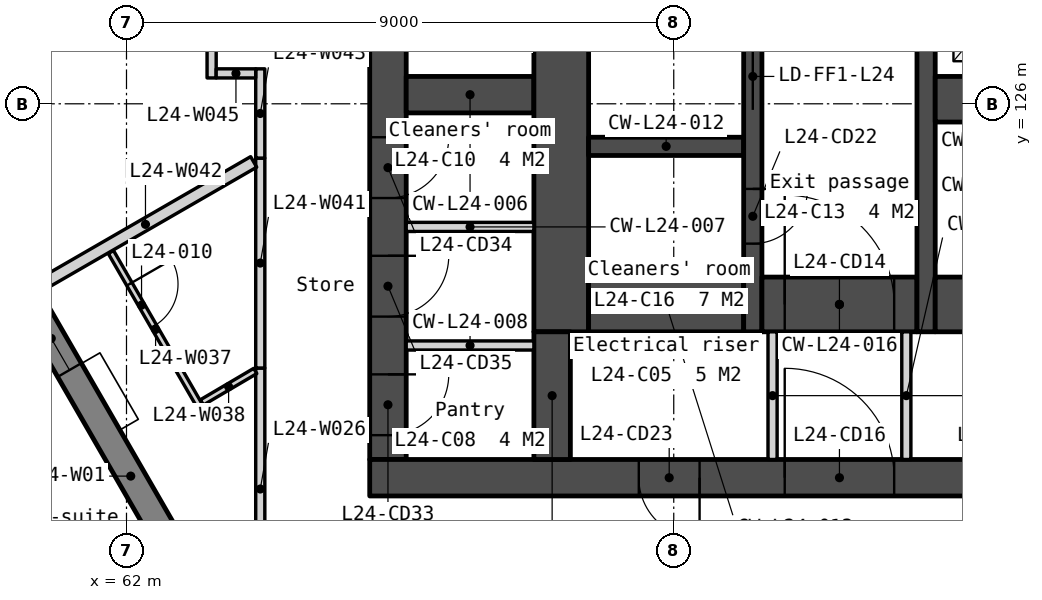
"""IFC4 building model, lengths in metres.
Left out: names, types, materials, properties, quantities, classifications, styles, units other than length and angle.
Written with IfcOpenShell. Run it as: python <this file> out.ifc"""

import sys

from ifc_helpers import new_model, si_unit, direction, frame, frame_2d, origin, place, context, subcontext, project, spatial, polyline, rectangle, outline, extrude, element, fill, save


model = new_model("IFC4")
c1 = context("Model", 3, precision=1e-05, world=origin(), true_north=direction((0.0, 1.0)))
c2 = subcontext(c1, "Body", "Model", "MODEL_VIEW")
j1 = project(units=[si_unit("LENGTHUNIT", "METRE"), si_unit("PLANEANGLEUNIT", "RADIAN")], contexts=[c1])
p1 = place(None, origin())
s1 = spatial("IfcSite", under=j1, at=p1, CompositionType="ELEMENT")
p2 = place(p1, origin())
s2 = spatial("IfcBuilding", under=s1, at=p2, CompositionType="ELEMENT")
p3 = place(p2, frame((0.0, 0.0, 99.3)))
s3 = spatial("IfcBuildingStorey", under=s2, at=p3, CompositionType="ELEMENT", Elevation=99.3)
p4 = place(p3, frame((66.3, 133.95, 0.0), z_axis=(0.0, 0.0, 1.0), x_axis=(0.0, -1.0, 0.0)))
e1 = element("IfcWall", 1, at=p4, inside=s3, PredefinedType="SOLIDWALL", context=c2, shape_type="SweptSolid", body=[
    extrude(rectangle(XDim=13.8, YDim=0.6, at=frame_2d((6.9, 0.0))), origin(), (0.0, 0.0, 1.0), 3.35),
])
p5 = place(p4, frame((0.6, 0.0, 0.0)))
e2 = element("IfcOpeningElement", 2, at=p5, cuts=e1, PredefinedType="OPENING", context=c2, shape_type="SweptSolid", body=[
    extrude(rectangle(XDim=1.1, YDim=2.1, at=frame_2d((0.55, 1.05))), frame((0.0, 0.31, 0.0), z_axis=(0.0, -1.0, 0.0), x_axis=(1.0, 0.0, 0.0)), (0.0, 0.0, 1.0), 0.62),
])
p6 = place(p4, frame((12.4, 0.0, 0.0)))
e3 = element("IfcOpeningElement", 3, at=p6, cuts=e1, PredefinedType="OPENING", context=c2, shape_type="SweptSolid", body=[
    extrude(rectangle(XDim=1.0, YDim=2.1, at=frame_2d((0.5, 1.05))), frame((0.0, 0.31, 0.0), z_axis=(0.0, -1.0, 0.0), x_axis=(1.0, 0.0, 0.0)), (0.0, 0.0, 1.0), 0.62),
])
p7 = place(p4, frame((8.5, 0.0, 0.0)))
e4 = element("IfcOpeningElement", 4, at=p7, cuts=e1, PredefinedType="OPENING", context=c2, shape_type="SweptSolid", body=[
    extrude(rectangle(XDim=1.0, YDim=2.1, at=frame_2d((0.5, 1.05))), frame((0.0, 0.31, 0.0), z_axis=(0.0, -1.0, 0.0), x_axis=(1.0, 0.0, 0.0)), (0.0, 0.0, 1.0), 0.62),
])
p8 = place(p4, frame((10.45, 0.0, 0.0)))
e5 = element("IfcOpeningElement", 5, at=p8, cuts=e1, PredefinedType="OPENING", context=c2, shape_type="SweptSolid", body=[
    extrude(rectangle(XDim=1.0, YDim=2.1, at=frame_2d((0.5, 1.05))), frame((0.0, 0.31, 0.0), z_axis=(0.0, -1.0, 0.0), x_axis=(1.0, 0.0, 0.0)), (0.0, 0.0, 1.0), 0.62),
])
p9 = place(p3, frame((66.0, 119.85, 0.0), z_axis=(0.0, 0.0, 1.0), x_axis=(1.0, 0.0, 0.0)))
e6 = element("IfcWall", 6, at=p9, inside=s3, PredefinedType="SOLIDWALL", context=c2, shape_type="SweptSolid", body=[
    extrude(rectangle(XDim=28.0, YDim=0.6, at=frame_2d((14.0, 0.0))), origin(), (0.0, 0.0, 1.0), 3.35),
])
p10 = place(p9, frame((6.825, 0.0, 0.0)))
e7 = element("IfcOpeningElement", 7, at=p10, cuts=e6, PredefinedType="OPENING", context=c2, shape_type="SweptSolid", body=[
    extrude(rectangle(XDim=1.8, YDim=2.1, at=frame_2d((0.9, 1.05))), frame((0.0, 0.31, 0.0), z_axis=(0.0, -1.0, 0.0), x_axis=(1.0, 0.0, 0.0)), (0.0, 0.0, 1.0), 0.62),
])
p11 = place(p9, frame((15.85, 0.0, 0.0)))
e8 = element("IfcOpeningElement", 8, at=p11, cuts=e6, PredefinedType="OPENING", context=c2, shape_type="SweptSolid", body=[
    extrude(rectangle(XDim=1.5, YDim=2.1, at=frame_2d((0.75, 1.05))), frame((0.0, 0.31, 0.0), z_axis=(0.0, -1.0, 0.0), x_axis=(1.0, 0.0, 0.0)), (0.0, 0.0, 1.0), 0.62),
])
p12 = place(p9, frame((19.375, 0.0, 0.0)))
e9 = element("IfcOpeningElement", 9, at=p12, cuts=e6, PredefinedType="OPENING", context=c2, shape_type="SweptSolid", body=[
    extrude(rectangle(XDim=1.8, YDim=2.1, at=frame_2d((0.9, 1.05))), frame((0.0, 0.31, 0.0), z_axis=(0.0, -1.0, 0.0), x_axis=(1.0, 0.0, 0.0)), (0.0, 0.0, 1.0), 0.62),
])
p13 = place(p9, frame((4.425, 0.0, 0.0)))
e10 = element("IfcOpeningElement", 10, at=p13, cuts=e6, PredefinedType="OPENING", context=c2, shape_type="SweptSolid", body=[
    extrude(rectangle(XDim=1.0, YDim=2.1, at=frame_2d((0.5, 1.05))), frame((0.0, 0.31, 0.0), z_axis=(0.0, -1.0, 0.0), x_axis=(1.0, 0.0, 0.0)), (0.0, 0.0, 1.0), 0.62),
])
p14 = place(p9, frame((9.925, 0.0, 0.0)))
e11 = element("IfcOpeningElement", 11, at=p14, cuts=e6, PredefinedType="OPENING", context=c2, shape_type="SweptSolid", body=[
    extrude(rectangle(XDim=1.0, YDim=2.1, at=frame_2d((0.5, 1.05))), frame((0.0, 0.31, 0.0), z_axis=(0.0, -1.0, 0.0), x_axis=(1.0, 0.0, 0.0)), (0.0, 0.0, 1.0), 0.62),
])
p15 = place(p9, frame((13.125, 0.0, 0.0)))
e12 = element("IfcOpeningElement", 12, at=p15, cuts=e6, PredefinedType="OPENING", context=c2, shape_type="SweptSolid", body=[
    extrude(rectangle(XDim=1.0, YDim=2.1, at=frame_2d((0.5, 1.05))), frame((0.0, 0.31, 0.0), z_axis=(0.0, -1.0, 0.0), x_axis=(1.0, 0.0, 0.0)), (0.0, 0.0, 1.0), 0.62),
])
p16 = place(p9, frame((21.725, 0.0, 0.0)))
e13 = element("IfcOpeningElement", 13, at=p16, cuts=e6, PredefinedType="OPENING", context=c2, shape_type="SweptSolid", body=[
    extrude(rectangle(XDim=1.0, YDim=2.1, at=frame_2d((0.5, 1.05))), frame((0.0, 0.31, 0.0), z_axis=(0.0, -1.0, 0.0), x_axis=(1.0, 0.0, 0.0)), (0.0, 0.0, 1.0), 0.62),
])
p17 = place(p9, frame((23.425, 0.0, 0.0)))
e14 = element("IfcOpeningElement", 14, at=p17, cuts=e6, PredefinedType="OPENING", context=c2, shape_type="SweptSolid", body=[
    extrude(rectangle(XDim=1.0, YDim=2.1, at=frame_2d((0.5, 1.05))), frame((0.0, 0.31, 0.0), z_axis=(0.0, -1.0, 0.0), x_axis=(1.0, 0.0, 0.0)), (0.0, 0.0, 1.0), 0.62),
])
p18 = place(p3, frame((66.6, 126.15, 0.0), z_axis=(0.0, 0.0, 1.0), x_axis=(1.0, 0.0, 0.0)))
e15 = element("IfcWall", 15, at=p18, inside=s3, PredefinedType="SOLIDWALL", context=c2, shape_type="SweptSolid", body=[
    extrude(rectangle(XDim=2.1, YDim=0.6, at=frame_2d((1.05, 0.0))), origin(), (0.0, 0.0, 1.0), 3.35),
])
for number, where, z_axis, x_axis in (
    (16, (66.6, 123.975, 0.0), (0.0, 0.0, 1.0), (1.0, 0.0, 0.0)),
    (17, (66.6, 122.025, 0.0), (0.0, 0.0, 1.0), (1.0, 0.0, 0.0)),
):
    element("IfcWall", number, at=place(p3, frame(where, z_axis=z_axis, x_axis=x_axis)), inside=s3, PredefinedType="PARTITIONING", context=c2, shape_type="SweptSolid", body=[
        extrude(rectangle(XDim=2.1, YDim=0.15, at=frame_2d((1.05, 0.0))), origin(), (0.0, 0.0, 1.0), 3.35),
    ])
p19 = place(p3, frame((69.15, 133.95, 0.0), z_axis=(0.0, 0.0, 1.0), x_axis=(0.0, -1.0, 0.0)))
e18 = element("IfcWall", 18, at=p19, inside=s3, PredefinedType="SOLIDWALL", context=c2, shape_type="SweptSolid", body=[
    extrude(rectangle(XDim=11.7, YDim=0.9, at=frame_2d((5.85, 0.0))), origin(), (0.0, 0.0, 1.0), 3.35),
])
p20 = place(p3, frame((69.0, 122.25, 0.0), z_axis=(0.0, 0.0, 1.0), x_axis=(0.0, -1.0, 0.0)))
e19 = element("IfcWall", 19, at=p20, inside=s3, PredefinedType="SOLIDWALL", context=c2, shape_type="SweptSolid", body=[
    extrude(rectangle(XDim=2.1, YDim=0.6, at=frame_2d((1.05, 0.0))), origin(), (0.0, 0.0, 1.0), 3.35),
])
p21 = place(p3, frame((69.6, 125.3, 0.0), z_axis=(0.0, 0.0, 1.0), x_axis=(1.0, 0.0, 0.0)))
e20 = element("IfcWall", 20, at=p21, inside=s3, PredefinedType="SOLIDWALL", context=c2, shape_type="SweptSolid", body=[
    extrude(rectangle(XDim=2.55, YDim=0.3, at=frame_2d((1.275, 0.0))), origin(), (0.0, 0.0, 1.0), 3.35),
])
p22 = place(p3, frame((69.6, 122.7, 0.0), z_axis=(0.0, 0.0, 1.0), x_axis=(1.0, 0.0, 0.0)))
e21 = element("IfcWall", 21, at=p22, inside=s3, PredefinedType="SOLIDWALL", context=c2, shape_type="SweptSolid", body=[
    extrude(rectangle(XDim=2.55, YDim=0.9, at=frame_2d((1.275, 0.0))), origin(), (0.0, 0.0, 1.0), 3.35),
])
p23 = place(p3, frame((72.3, 133.95, 0.0), z_axis=(0.0, 0.0, 1.0), x_axis=(0.0, -1.0, 0.0)))
e22 = element("IfcWall", 22, at=p23, inside=s3, PredefinedType="SOLIDWALL", context=c2, shape_type="SweptSolid", body=[
    extrude(rectangle(XDim=11.7, YDim=0.3, at=frame_2d((5.85, 0.0))), origin(), (0.0, 0.0, 1.0), 3.35),
])
p24 = place(p23, frame((6.95, 0.0, 0.0)))
e23 = element("IfcOpeningElement", 23, at=p24, cuts=e22, PredefinedType="OPENING", context=c2, shape_type="SweptSolid", body=[
    extrude(rectangle(XDim=1.1, YDim=2.1, at=frame_2d((0.55, 1.05))), frame((0.0, 0.16, 0.0), z_axis=(0.0, -1.0, 0.0), x_axis=(1.0, 0.0, 0.0)), (0.0, 0.0, 1.0), 0.32),
])
p25 = place(p23, frame((9.35, 0.0, 0.0)))
e24 = element("IfcOpeningElement", 24, at=p25, cuts=e22, PredefinedType="OPENING", context=c2, shape_type="SweptSolid", body=[
    extrude(rectangle(XDim=0.9, YDim=2.1, at=frame_2d((0.45, 1.05))), frame((0.0, 0.16, 0.0), z_axis=(0.0, -1.0, 0.0), x_axis=(1.0, 0.0, 0.0)), (0.0, 0.0, 1.0), 0.32),
])
p26 = place(p23, frame((5.1, 0.0, 0.0)))
e25 = element("IfcOpeningElement", 25, at=p26, cuts=e22, PredefinedType="OPENING", context=c2, shape_type="SweptSolid", body=[
    extrude(rectangle(XDim=1.0, YDim=2.1, at=frame_2d((0.5, 1.05))), frame((0.0, 0.16, 0.0), z_axis=(0.0, -1.0, 0.0), x_axis=(1.0, 0.0, 0.0)), (0.0, 0.0, 1.0), 0.32),
])
p27 = place(p3, frame((72.45, 122.7, 0.0), z_axis=(0.0, 0.0, 1.0), x_axis=(1.0, 0.0, 0.0)))
e26 = element("IfcWall", 26, at=p27, inside=s3, PredefinedType="SOLIDWALL", context=c2, shape_type="SweptSolid", body=[
    extrude(rectangle(XDim=2.55, YDim=0.9, at=frame_2d((1.275, 0.0))), origin(), (0.0, 0.0, 1.0), 3.35),
])
p28 = place(p27, frame((0.375, 0.0, 0.0)))
e27 = element("IfcOpeningElement", 27, at=p28, cuts=e26, PredefinedType="OPENING", context=c2, shape_type="SweptSolid", body=[
    extrude(rectangle(XDim=1.8, YDim=2.1, at=frame_2d((0.9, 1.05))), frame((0.0, 0.46, 0.0), z_axis=(0.0, -1.0, 0.0), x_axis=(1.0, 0.0, 0.0)), (0.0, 0.0, 1.0), 0.92),
])
for number, where, z_axis, x_axis in (
    (28, (72.625, 122.25, 0.0), (0.0, 0.0, 1.0), (0.0, -1.0, 0.0)),
    (29, (74.825, 122.25, 0.0), (0.0, 0.0, 1.0), (0.0, -1.0, 0.0)),
):
    element("IfcWall", number, at=place(p3, frame(where, z_axis=z_axis, x_axis=x_axis)), inside=s3, PredefinedType="PARTITIONING", context=c2, shape_type="SweptSolid", body=[
        extrude(rectangle(XDim=2.1, YDim=0.15, at=frame_2d((1.05, 0.0))), origin(), (0.0, 0.0, 1.0), 3.35),
    ])
p29 = place(p3, frame((75.15, 133.95, 0.0), z_axis=(0.0, 0.0, 1.0), x_axis=(0.0, -1.0, 0.0)))
e30 = element("IfcWall", 30, at=p29, inside=s3, PredefinedType="SOLIDWALL", context=c2, shape_type="SweptSolid", body=[
    extrude(rectangle(XDim=11.7, YDim=0.3, at=frame_2d((5.85, 0.0))), origin(), (0.0, 0.0, 1.0), 3.35),
])
p30 = place(p3, frame((75.3, 126.075, 0.0), z_axis=(0.0, 0.0, 1.0), x_axis=(1.0, 0.0, 0.0)))
e31 = element("IfcWall", 31, at=p30, inside=s3, PredefinedType="SOLIDWALL", context=c2, shape_type="SweptSolid", body=[
    extrude(rectangle(XDim=2.1, YDim=0.75, at=frame_2d((1.05, 0.0))), origin(), (0.0, 0.0, 1.0), 3.35),
])
p31 = place(p3, frame((75.3, 122.7, 0.0), z_axis=(0.0, 0.0, 1.0), x_axis=(1.0, 0.0, 0.0)))
e32 = element("IfcWall", 32, at=p31, inside=s3, PredefinedType="SOLIDWALL", context=c2, shape_type="SweptSolid", body=[
    extrude(rectangle(XDim=6.2, YDim=0.9, at=frame_2d((3.1, 0.0))), origin(), (0.0, 0.0, 1.0), 3.35),
])
p32 = place(p3, frame((56.073, 130.263, -0.15), z_axis=(0.0, 0.0, 1.0), x_axis=(0.500002343971, -0.866024050488, 0.0)))
e33 = element("IfcWall", 33, at=p32, inside=s3, PredefinedType="SOLIDWALL", context=c2, shape_type="SweptSolid", body=[
    extrude(outline(polyline([(0.0, 0.0), (0.0, 3.5), (23.986, 3.5), (23.986, 0.0), (0.0, 0.0)])), frame((0.0, 0.225, 0.0), z_axis=(0.0, -1.0, 0.0), x_axis=(1.0, 0.0, 0.0)), (0.0, 0.0, 1.0), 0.45),
])
p33 = place(p32, frame((7.079, 0.0, 1.05)))
e34 = element("IfcOpeningElement", 34, at=p33, cuts=e33, PredefinedType="OPENING", context=c2, shape_type="SweptSolid", body=[
    extrude(rectangle(XDim=1.2, YDim=1.5, at=frame_2d((0.6, 0.75))), frame((0.0, 0.235, 0.0), z_axis=(0.0, -1.0, 0.0), x_axis=(1.0, 0.0, 0.0)), (0.0, 0.0, 1.0), 0.47),
])
p34 = place(p32, frame((8.779, 0.0, 1.05)))
e35 = element("IfcOpeningElement", 35, at=p34, cuts=e33, PredefinedType="OPENING", context=c2, shape_type="SweptSolid", body=[
    extrude(rectangle(XDim=1.2, YDim=1.5, at=frame_2d((0.6, 0.75))), frame((0.0, 0.235, 0.0), z_axis=(0.0, -1.0, 0.0), x_axis=(1.0, 0.0, 0.0)), (0.0, 0.0, 1.0), 0.47),
])
p35 = place(p32, frame((15.607, 0.0, 1.05)))
e36 = element("IfcOpeningElement", 36, at=p35, cuts=e33, PredefinedType="OPENING", context=c2, shape_type="SweptSolid", body=[
    extrude(rectangle(XDim=1.2, YDim=1.5, at=frame_2d((0.6, 0.75))), frame((0.0, 0.235, 0.0), z_axis=(0.0, -1.0, 0.0), x_axis=(1.0, 0.0, 0.0)), (0.0, 0.0, 1.0), 0.47),
])
p36 = place(p32, frame((17.307, 0.0, 1.05)))
e37 = element("IfcOpeningElement", 37, at=p36, cuts=e33, PredefinedType="OPENING", context=c2, shape_type="SweptSolid", body=[
    extrude(rectangle(XDim=1.2, YDim=1.5, at=frame_2d((0.6, 0.75))), frame((0.0, 0.235, 0.0), z_axis=(0.0, -1.0, 0.0), x_axis=(1.0, 0.0, 0.0)), (0.0, 0.0, 1.0), 0.47),
])
p37 = place(p3, frame((64.2, 117.675, 0.0), z_axis=(0.0, 0.0, 1.0), x_axis=(0.0, 1.0, 0.0)))
e38 = element("IfcWall", 38, at=p37, inside=s3, PredefinedType="PARTITIONING", context=c2, shape_type="SweptSolid", body=[
    extrude(rectangle(XDim=3.979, YDim=0.15, at=frame_2d((1.99, 0.0))), origin(), (0.0, 0.0, 1.0), 3.35),
])
p38 = place(p3, frame((61.743, 123.562, 0.0), z_axis=(0.0, 0.0, 1.0), x_axis=(0.500050696077, -0.865996132412, 0.0)))
e39 = element("IfcWall", 39, at=p38, inside=s3, PredefinedType="PARTITIONING", context=c2, shape_type="SweptSolid", body=[
    extrude(rectangle(XDim=2.94, YDim=0.1, at=frame_2d((1.47, 0.0))), origin(), (0.0, 0.0, 1.0), 3.35),
])
p39 = place(p38, frame((0.608, 0.0, 0.0)))
e40 = element("IfcOpeningElement", 40, at=p39, cuts=e39, PredefinedType="OPENING", context=c2, shape_type="SweptSolid", body=[
    extrude(rectangle(XDim=0.8, YDim=2.1, at=frame_2d((0.4, 1.05))), frame((0.0, 0.06, 0.0), z_axis=(0.0, -1.0, 0.0), x_axis=(1.0, 0.0, 0.0)), (0.0, 0.0, 1.0), 0.12),
])
p40 = place(p3, frame((63.24, 121.089, 0.0), z_axis=(0.0, 0.0, 1.0), x_axis=(0.861755507635, 0.507323806914, 0.0)))
e41 = element("IfcWall", 41, at=p40, inside=s3, PredefinedType="PARTITIONING", context=c2, shape_type="SweptSolid", body=[
    extrude(rectangle(XDim=1.019, YDim=0.1, at=frame_2d((0.509, 0.0))), origin(), (0.0, 0.0, 1.0), 3.35),
])
p41 = place(p3, frame((64.2, 121.654, 0.0), z_axis=(0.0, 0.0, 1.0), x_axis=(0.0, 1.0, 0.0)))
e42 = element("IfcWall", 42, at=p41, inside=s3, PredefinedType="PARTITIONING", context=c2, shape_type="SweptSolid", body=[
    extrude(rectangle(XDim=3.453, YDim=0.15, at=frame_2d((1.726, 0.0))), origin(), (0.0, 0.0, 1.0), 3.35),
])
p42 = place(p3, frame((60.532, 122.989, 0.0), z_axis=(0.0, 0.0, 1.0), x_axis=(0.866030279993, 0.499991554064, 0.0)))
e43 = element("IfcWall", 43, at=p42, inside=s3, PredefinedType="PARTITIONING", context=c2, shape_type="SweptSolid", body=[
    extrude(rectangle(XDim=4.11, YDim=0.2, at=frame_2d((2.055, 0.0))), origin(), (0.0, 0.0, 1.0), 3.35),
])
p43 = place(p3, frame((64.2, 125.107, 0.0), z_axis=(0.0, 0.0, 1.0), x_axis=(0.0, 1.0, 0.0)))
e44 = element("IfcWall", 44, at=p43, inside=s3, PredefinedType="PARTITIONING", context=c2, shape_type="SweptSolid", body=[
    extrude(rectangle(XDim=1.468, YDim=0.15, at=frame_2d((0.734, 0.0))), origin(), (0.0, 0.0, 1.0), 3.35),
])
p44 = place(p3, frame((63.4, 126.425, 0.0), z_axis=(0.0, 0.0, 1.0), x_axis=(0.0, 1.0, 0.0)))
e45 = element("IfcWall", 45, at=p44, inside=s3, PredefinedType="PARTITIONING", context=c2, shape_type="SweptSolid", body=[
    extrude(rectangle(XDim=7.65, YDim=0.15, at=frame_2d((3.825, 0.0))), origin(), (0.0, 0.0, 1.0), 3.35),
])
p45 = place(p44, frame((3.325, 0.0, 0.0)))
e46 = element("IfcOpeningElement", 46, at=p45, cuts=e45, PredefinedType="OPENING", context=c2, shape_type="SweptSolid", body=[
    extrude(rectangle(XDim=1.0, YDim=2.1, at=frame_2d((0.5, 1.05))), frame((0.0, 0.085, 0.0), z_axis=(0.0, -1.0, 0.0), x_axis=(1.0, 0.0, 0.0)), (0.0, 0.0, 1.0), 0.17),
])
p46 = place(p3, frame((63.475, 126.5, 0.0), z_axis=(0.0, 0.0, 1.0), x_axis=(1.0, 0.0, 0.0)))
e47 = element("IfcWall", 47, at=p46, inside=s3, PredefinedType="PARTITIONING", context=c2, shape_type="SweptSolid", body=[
    extrude(rectangle(XDim=0.65, YDim=0.15, at=frame_2d((0.325, 0.0))), origin(), (0.0, 0.0, 1.0), 3.35),
])
p47 = place(p24, origin())
e48 = element("IfcDoor", 48, at=p47, inside=s3, OperationType="SLIDING_TO_LEFT", PredefinedType="DOOR", context=c2, shape_type="SweptSolid", body=[
    extrude(rectangle(XDim=1.1, YDim=2.1, at=frame_2d((0.55, 1.05))), frame((0.0, 0.025, 0.0), z_axis=(0.0, -1.0, 0.0), x_axis=(1.0, 0.0, 0.0)), (0.0, 0.0, 1.0), 0.05),
])
fill(e23, e48)
p48 = place(p28, origin())
e49 = element("IfcDoor", 49, at=p48, inside=s3, OperationType="DOUBLE_DOOR_DOUBLE_SWING", PredefinedType="DOOR", context=c2, shape_type="SweptSolid", body=[
    extrude(rectangle(XDim=1.8, YDim=2.1, at=frame_2d((0.9, 1.05))), frame((0.0, 0.025, 0.0), z_axis=(0.0, -1.0, 0.0), x_axis=(1.0, 0.0, 0.0)), (0.0, 0.0, 1.0), 0.05),
])
fill(e27, e49)
p49 = place(p10, origin())
e50 = element("IfcDoor", 50, at=p49, inside=s3, OperationType="DOUBLE_DOOR_DOUBLE_SWING", PredefinedType="DOOR", context=c2, shape_type="SweptSolid", body=[
    extrude(rectangle(XDim=1.8, YDim=2.1, at=frame_2d((0.9, 1.05))), frame((0.0, 0.025, 0.0), z_axis=(0.0, -1.0, 0.0), x_axis=(1.0, 0.0, 0.0)), (0.0, 0.0, 1.0), 0.05),
])
fill(e7, e50)
p50 = place(p25, origin())
e51 = element("IfcDoor", 51, at=p50, inside=s3, OperationType="SINGLE_SWING_LEFT", PredefinedType="DOOR", context=c2, shape_type="SweptSolid", body=[
    extrude(rectangle(XDim=0.9, YDim=2.1, at=frame_2d((0.45, 1.05))), frame((0.0, 0.025, 0.0), z_axis=(0.0, -1.0, 0.0), x_axis=(1.0, 0.0, 0.0)), (0.0, 0.0, 1.0), 0.05),
])
fill(e24, e51)
p51 = place(p13, origin())
e52 = element("IfcDoor", 52, at=p51, inside=s3, OperationType="SINGLE_SWING_RIGHT", PredefinedType="DOOR", context=c2, shape_type="SweptSolid", body=[
    extrude(rectangle(XDim=1.0, YDim=2.1, at=frame_2d((0.5, 1.05))), frame((0.0, 0.025, 0.0), z_axis=(0.0, -1.0, 0.0), x_axis=(1.0, 0.0, 0.0)), (0.0, 0.0, 1.0), 0.05),
])
fill(e10, e52)
p52 = place(p6, origin())
e53 = element("IfcDoor", 53, at=p52, inside=s3, OperationType="SINGLE_SWING_LEFT", PredefinedType="DOOR", context=c2, shape_type="SweptSolid", body=[
    extrude(rectangle(XDim=1.0, YDim=2.1, at=frame_2d((0.5, 1.05))), frame((0.0, 0.025, 0.0), z_axis=(0.0, -1.0, 0.0), x_axis=(1.0, 0.0, 0.0)), (0.0, 0.0, 1.0), 0.05),
])
fill(e3, e53)
p53 = place(p7, origin())
e54 = element("IfcDoor", 54, at=p53, inside=s3, OperationType="SINGLE_SWING_LEFT", PredefinedType="DOOR", context=c2, shape_type="SweptSolid", body=[
    extrude(rectangle(XDim=1.0, YDim=2.1, at=frame_2d((0.5, 1.05))), frame((0.0, 0.025, 0.0), z_axis=(0.0, -1.0, 0.0), x_axis=(1.0, 0.0, 0.0)), (0.0, 0.0, 1.0), 0.05),
])
fill(e4, e54)
p54 = place(p8, origin())
e55 = element("IfcDoor", 55, at=p54, inside=s3, OperationType="SINGLE_SWING_LEFT", PredefinedType="DOOR", context=c2, shape_type="SweptSolid", body=[
    extrude(rectangle(XDim=1.0, YDim=2.1, at=frame_2d((0.5, 1.05))), frame((0.0, 0.025, 0.0), z_axis=(0.0, -1.0, 0.0), x_axis=(1.0, 0.0, 0.0)), (0.0, 0.0, 1.0), 0.05),
])
fill(e5, e55)
p55 = place(p34, origin())
e56 = element("IfcWindow", 56, at=p55, inside=s3, PartitioningType="SINGLE_PANEL", PredefinedType="WINDOW", context=c2, shape_type="SweptSolid", body=[
    extrude(rectangle(XDim=1.2, YDim=1.5, at=frame_2d((0.6, 0.75))), frame((0.0, 0.03, 0.0), z_axis=(0.0, -1.0, 0.0), x_axis=(1.0, 0.0, 0.0)), (0.0, 0.0, 1.0), 0.06),
])
fill(e35, e56)
p56 = place(p39, origin())
e57 = element("IfcDoor", 57, at=p56, inside=s3, OperationType="SINGLE_SWING_LEFT", PredefinedType="DOOR", context=c2, shape_type="SweptSolid", body=[
    extrude(rectangle(XDim=0.8, YDim=2.1, at=frame_2d((0.4, 1.05))), frame((0.0, 0.025, 0.0), z_axis=(0.0, -1.0, 0.0), x_axis=(1.0, 0.0, 0.0)), (0.0, 0.0, 1.0), 0.05),
])
fill(e40, e57)
save(model, sys.argv[1])
